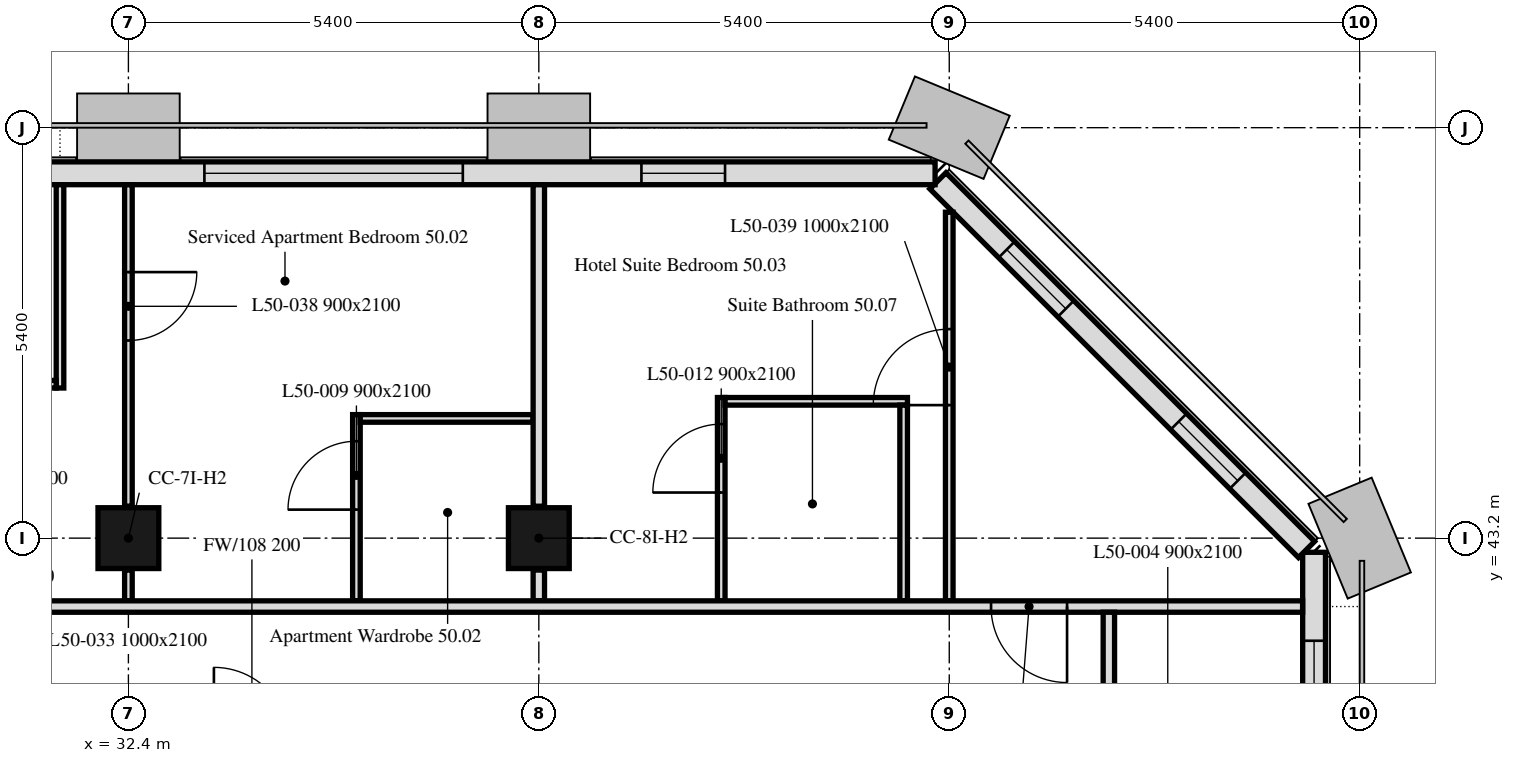
"""IFC4 building model, lengths in metres.
Left out: names, types, materials, properties, quantities, classifications, styles, units other than length and angle.
Written with IfcOpenShell. Run it as: python <this file> out.ifc"""

import sys

from ifc_helpers import new_model, si_unit, direction, frame, frame_2d, origin, origin_2d, place, context, subcontext, project, spatial, rectangle, extrude, element, fill, save


model = new_model("IFC4")
c1 = context("Model", 3, precision=1e-05, world=origin(), true_north=direction((0.0, 1.0)))
c2 = subcontext(c1, "Body", "Model", "MODEL_VIEW")
j1 = project(units=[si_unit("LENGTHUNIT", "METRE"), si_unit("PLANEANGLEUNIT", "RADIAN")], contexts=[c1])
p1 = place(None, origin())
s1 = spatial("IfcSite", under=j1, at=p1, CompositionType="ELEMENT")
p2 = place(p1, origin())
s2 = spatial("IfcBuilding", under=s1, at=p2, CompositionType="ELEMENT")
p3 = place(p2, frame((0.0, 0.0, 203.8)))
s3 = spatial("IfcBuildingStorey", under=s2, at=p3, CompositionType="ELEMENT", Elevation=203.8)
for number, where, z_axis, x_axis in (
    (1, (32.4, 43.2, 0.0), (0.0, 0.0, 1.0), (1.0, 0.0, 0.0)),
    (2, (37.8, 43.2, 0.0), (0.0, 0.0, 1.0), (1.0, 0.0, 0.0)),
):
    element("IfcColumn", number, at=place(p3, frame(where, z_axis=z_axis, x_axis=x_axis)), inside=s3, PredefinedType="COLUMN", context=c2, shape_type="SweptSolid", body=[
        extrude(rectangle(XDim=0.8, YDim=0.8, at=origin_2d()), origin(), (0.0, 0.0, 1.0), 3.0),
    ])
p4 = place(p3, frame((48.0, 10.986, 0.0), z_axis=(0.0, 0.0, 1.0), x_axis=(0.0, 1.0, 0.0)))
e3 = element("IfcWall", 3, at=p4, inside=s3, PredefinedType="SOLIDWALL", context=c2, shape_type="SweptSolid", body=[
    extrude(rectangle(XDim=32.027, YDim=0.3, at=frame_2d((16.014, 0.0))), origin(), (0.0, 0.0, 1.0), 3.0),
])
p5 = place(p4, frame((1.164, 0.0, 0.9)))
e4 = element("IfcOpeningElement", 4, at=p5, cuts=e3, PredefinedType="OPENING", context=c2, shape_type="SweptSolid", body=[
    extrude(rectangle(XDim=1.1, YDim=1.7, at=frame_2d((0.55, 0.85))), frame((0.0, 0.16, 0.0), z_axis=(0.0, -1.0, 0.0), x_axis=(1.0, 0.0, 0.0)), (0.0, 0.0, 1.0), 0.32),
])
p6 = place(p4, frame((2.764, 0.0, 0.9)))
e5 = element("IfcOpeningElement", 5, at=p6, cuts=e3, PredefinedType="OPENING", context=c2, shape_type="SweptSolid", body=[
    extrude(rectangle(XDim=1.1, YDim=1.7, at=frame_2d((0.55, 0.85))), frame((0.0, 0.16, 0.0), z_axis=(0.0, -1.0, 0.0), x_axis=(1.0, 0.0, 0.0)), (0.0, 0.0, 1.0), 0.32),
])
p7 = place(p4, frame((6.214, 0.0, 0.9)))
e6 = element("IfcOpeningElement", 6, at=p7, cuts=e3, PredefinedType="OPENING", context=c2, shape_type="SweptSolid", body=[
    extrude(rectangle(XDim=3.4, YDim=1.7, at=frame_2d((1.7, 0.85))), frame((0.0, 0.16, 0.0), z_axis=(0.0, -1.0, 0.0), x_axis=(1.0, 0.0, 0.0)), (0.0, 0.0, 1.0), 0.32),
])
p8 = place(p4, frame((11.964, 0.0, 0.9)))
e7 = element("IfcOpeningElement", 7, at=p8, cuts=e3, PredefinedType="OPENING", context=c2, shape_type="SweptSolid", body=[
    extrude(rectangle(XDim=1.1, YDim=1.7, at=frame_2d((0.55, 0.85))), frame((0.0, 0.16, 0.0), z_axis=(0.0, -1.0, 0.0), x_axis=(1.0, 0.0, 0.0)), (0.0, 0.0, 1.0), 0.32),
])
p9 = place(p4, frame((13.564, 0.0, 0.9)))
e8 = element("IfcOpeningElement", 8, at=p9, cuts=e3, PredefinedType="OPENING", context=c2, shape_type="SweptSolid", body=[
    extrude(rectangle(XDim=1.1, YDim=1.7, at=frame_2d((0.55, 0.85))), frame((0.0, 0.16, 0.0), z_axis=(0.0, -1.0, 0.0), x_axis=(1.0, 0.0, 0.0)), (0.0, 0.0, 1.0), 0.32),
])
p10 = place(p4, frame((17.014, 0.0, 0.9)))
e9 = element("IfcOpeningElement", 9, at=p10, cuts=e3, PredefinedType="OPENING", context=c2, shape_type="SweptSolid", body=[
    extrude(rectangle(XDim=3.4, YDim=1.7, at=frame_2d((1.7, 0.85))), frame((0.0, 0.16, 0.0), z_axis=(0.0, -1.0, 0.0), x_axis=(1.0, 0.0, 0.0)), (0.0, 0.0, 1.0), 0.32),
])
p11 = place(p4, frame((22.764, 0.0, 0.9)))
e10 = element("IfcOpeningElement", 10, at=p11, cuts=e3, PredefinedType="OPENING", context=c2, shape_type="SweptSolid", body=[
    extrude(rectangle(XDim=1.1, YDim=1.7, at=frame_2d((0.55, 0.85))), frame((0.0, 0.16, 0.0), z_axis=(0.0, -1.0, 0.0), x_axis=(1.0, 0.0, 0.0)), (0.0, 0.0, 1.0), 0.32),
])
p12 = place(p4, frame((24.364, 0.0, 0.9)))
e11 = element("IfcOpeningElement", 11, at=p12, cuts=e3, PredefinedType="OPENING", context=c2, shape_type="SweptSolid", body=[
    extrude(rectangle(XDim=1.1, YDim=1.7, at=frame_2d((0.55, 0.85))), frame((0.0, 0.16, 0.0), z_axis=(0.0, -1.0, 0.0), x_axis=(1.0, 0.0, 0.0)), (0.0, 0.0, 1.0), 0.32),
])
p13 = place(p4, frame((28.789, 0.0, 0.9)))
e12 = element("IfcOpeningElement", 12, at=p13, cuts=e3, PredefinedType="OPENING", context=c2, shape_type="SweptSolid", body=[
    extrude(rectangle(XDim=0.65, YDim=1.7, at=frame_2d((0.325, 0.85))), frame((0.0, 0.16, 0.0), z_axis=(0.0, -1.0, 0.0), x_axis=(1.0, 0.0, 0.0)), (0.0, 0.0, 1.0), 0.32),
])
p14 = place(p4, frame((29.764, 0.0, 0.9)))
e13 = element("IfcOpeningElement", 13, at=p14, cuts=e3, PredefinedType="OPENING", context=c2, shape_type="SweptSolid", body=[
    extrude(rectangle(XDim=1.1, YDim=1.7, at=frame_2d((0.55, 0.85))), frame((0.0, 0.16, 0.0), z_axis=(0.0, -1.0, 0.0), x_axis=(1.0, 0.0, 0.0)), (0.0, 0.0, 1.0), 0.32),
])
p15 = place(p3, frame((47.901, 43.051, 0.0), z_axis=(0.0, 0.0, 1.0), x_axis=(-0.707106781187, 0.707106781187, 0.0)))
e14 = element("IfcWall", 14, at=p15, inside=s3, PredefinedType="SOLIDWALL", context=c2, shape_type="SweptSolid", body=[
    extrude(rectangle(XDim=6.86, YDim=0.3, at=frame_2d((3.43, 0.0))), origin(), (0.0, 0.0, 1.0), 3.0),
])
p16 = place(p15, frame((1.28, 0.0, 0.9)))
e15 = element("IfcOpeningElement", 15, at=p16, cuts=e14, PredefinedType="OPENING", context=c2, shape_type="SweptSolid", body=[
    extrude(rectangle(XDim=1.1, YDim=1.7, at=frame_2d((0.55, 0.85))), frame((0.0, 0.16, 0.0), z_axis=(0.0, -1.0, 0.0), x_axis=(1.0, 0.0, 0.0)), (0.0, 0.0, 1.0), 0.32),
])
p17 = place(p15, frame((4.48, 0.0, 0.9)))
e16 = element("IfcOpeningElement", 16, at=p17, cuts=e14, PredefinedType="OPENING", context=c2, shape_type="SweptSolid", body=[
    extrude(rectangle(XDim=1.1, YDim=1.7, at=frame_2d((0.55, 0.85))), frame((0.0, 0.16, 0.0), z_axis=(0.0, -1.0, 0.0), x_axis=(1.0, 0.0, 0.0)), (0.0, 0.0, 1.0), 0.32),
])
p18 = place(p3, frame((43.014, 48.0, 0.0), z_axis=(0.0, 0.0, 1.0), x_axis=(-1.0, 0.0, 0.0)))
e17 = element("IfcWall", 17, at=p18, inside=s3, PredefinedType="SOLIDWALL", context=c2, shape_type="SweptSolid", body=[
    extrude(rectangle(XDim=32.027, YDim=0.3, at=frame_2d((16.014, 0.0))), origin(), (0.0, 0.0, 1.0), 3.0),
])
p19 = place(p18, frame((2.764, 0.0, 0.9)))
e18 = element("IfcOpeningElement", 18, at=p19, cuts=e17, PredefinedType="OPENING", context=c2, shape_type="SweptSolid", body=[
    extrude(rectangle(XDim=1.1, YDim=1.7, at=frame_2d((0.55, 0.85))), frame((0.0, 0.16, 0.0), z_axis=(0.0, -1.0, 0.0), x_axis=(1.0, 0.0, 0.0)), (0.0, 0.0, 1.0), 0.32),
])
p20 = place(p18, frame((6.214, 0.0, 0.9)))
e19 = element("IfcOpeningElement", 19, at=p20, cuts=e17, PredefinedType="OPENING", context=c2, shape_type="SweptSolid", body=[
    extrude(rectangle(XDim=3.4, YDim=1.7, at=frame_2d((1.7, 0.85))), frame((0.0, 0.16, 0.0), z_axis=(0.0, -1.0, 0.0), x_axis=(1.0, 0.0, 0.0)), (0.0, 0.0, 1.0), 0.32),
])
p21 = place(p18, frame((12.664, 0.0, 0.9)))
e20 = element("IfcOpeningElement", 20, at=p21, cuts=e17, PredefinedType="OPENING", context=c2, shape_type="SweptSolid", body=[
    extrude(rectangle(XDim=1.1, YDim=1.7, at=frame_2d((0.55, 0.85))), frame((0.0, 0.16, 0.0), z_axis=(0.0, -1.0, 0.0), x_axis=(1.0, 0.0, 0.0)), (0.0, 0.0, 1.0), 0.32),
])
p22 = place(p18, frame((17.014, 0.0, 0.9)))
e21 = element("IfcOpeningElement", 21, at=p22, cuts=e17, PredefinedType="OPENING", context=c2, shape_type="SweptSolid", body=[
    extrude(rectangle(XDim=3.4, YDim=1.7, at=frame_2d((1.7, 0.85))), frame((0.0, 0.16, 0.0), z_axis=(0.0, -1.0, 0.0), x_axis=(1.0, 0.0, 0.0)), (0.0, 0.0, 1.0), 0.32),
])
p23 = place(p18, frame((23.464, 0.0, 0.9)))
e22 = element("IfcOpeningElement", 22, at=p23, cuts=e17, PredefinedType="OPENING", context=c2, shape_type="SweptSolid", body=[
    extrude(rectangle(XDim=1.1, YDim=1.7, at=frame_2d((0.55, 0.85))), frame((0.0, 0.16, 0.0), z_axis=(0.0, -1.0, 0.0), x_axis=(1.0, 0.0, 0.0)), (0.0, 0.0, 1.0), 0.32),
])
p24 = place(p18, frame((27.814, 0.0, 0.9)))
e23 = element("IfcOpeningElement", 23, at=p24, cuts=e17, PredefinedType="OPENING", context=c2, shape_type="SweptSolid", body=[
    extrude(rectangle(XDim=3.4, YDim=1.7, at=frame_2d((1.7, 0.85))), frame((0.0, 0.16, 0.0), z_axis=(0.0, -1.0, 0.0), x_axis=(1.0, 0.0, 0.0)), (0.0, 0.0, 1.0), 0.32),
])
p25 = place(p3, frame((32.4, 47.849, 0.0), z_axis=(0.0, 0.0, 1.0), x_axis=(0.0, -1.0, 0.0)))
e24 = element("IfcWall", 24, at=p25, inside=s3, PredefinedType="PARTITIONING", context=c2, shape_type="SweptSolid", body=[
    extrude(rectangle(XDim=4.229, YDim=0.1, at=frame_2d((2.115, 0.0))), origin(), (0.0, 0.0, 1.0), 2.4),
])
p26 = place(p25, frame((1.149, 0.0, 0.0)))
e25 = element("IfcOpeningElement", 25, at=p26, cuts=e24, PredefinedType="OPENING", context=c2, shape_type="SweptSolid", body=[
    extrude(rectangle(XDim=0.9, YDim=2.1, at=frame_2d((0.45, 1.05))), frame((0.0, 0.05, 0.0), z_axis=(0.0, -1.0, 0.0), x_axis=(1.0, 0.0, 0.0)), (0.0, 0.0, 1.0), 0.1),
])
p27 = place(p3, frame((32.4, 42.78, 0.0), z_axis=(0.0, 0.0, 1.0), x_axis=(0.0, -1.0, 0.0)))
e26 = element("IfcWall", 26, at=p27, inside=s3, PredefinedType="PARTITIONING", context=c2, shape_type="SweptSolid", body=[
    extrude(rectangle(XDim=0.405, YDim=0.1, at=frame_2d((0.203, 0.0))), origin(), (0.0, 0.0, 1.0), 2.4),
])
p28 = place(p3, frame((35.4, 42.375, 0.0), z_axis=(0.0, 0.0, 1.0), x_axis=(0.0, 1.0, 0.0)))
e27 = element("IfcWall", 27, at=p28, inside=s3, PredefinedType="PARTITIONING", context=c2, shape_type="SweptSolid", body=[
    extrude(rectangle(XDim=2.45, YDim=0.1, at=frame_2d((1.225, 0.0))), origin(), (0.0, 0.0, 1.0), 3.0),
])
p29 = place(p28, frame((1.2, 0.0, 0.0)))
e28 = element("IfcOpeningElement", 28, at=p29, cuts=e27, PredefinedType="OPENING", context=c2, shape_type="SweptSolid", body=[
    extrude(rectangle(XDim=0.9, YDim=2.1, at=frame_2d((0.45, 1.05))), frame((0.0, 0.05, 0.0), z_axis=(0.0, -1.0, 0.0), x_axis=(1.0, 0.0, 0.0)), (0.0, 0.0, 1.0), 0.1),
])
p30 = place(p3, frame((35.45, 44.775, 0.0), z_axis=(0.0, 0.0, 1.0), x_axis=(1.0, 0.0, 0.0)))
e29 = element("IfcWall", 29, at=p30, inside=s3, PredefinedType="PARTITIONING", context=c2, shape_type="SweptSolid", body=[
    extrude(rectangle(XDim=2.275, YDim=0.1, at=frame_2d((1.138, 0.0))), origin(), (0.0, 0.0, 1.0), 3.0),
])
p31 = place(p3, frame((31.5, 47.849, 0.0), z_axis=(0.0, 0.0, 1.0), x_axis=(0.0, -1.0, 0.0)))
e30 = element("IfcWall", 30, at=p31, inside=s3, PredefinedType="PARTITIONING", context=c2, shape_type="SweptSolid", body=[
    extrude(rectangle(XDim=2.674, YDim=0.1, at=frame_2d((1.337, 0.0))), origin(), (0.0, 0.0, 1.0), 3.0),
])
p32 = place(p3, frame((31.45, 45.225, 0.0), z_axis=(0.0, 0.0, 1.0), x_axis=(-1.0, 0.0, 0.0)))
e31 = element("IfcWall", 31, at=p32, inside=s3, PredefinedType="PARTITIONING", context=c2, shape_type="SweptSolid", body=[
    extrude(rectangle(XDim=2.3, YDim=0.1, at=frame_2d((1.15, 0.0))), origin(), (0.0, 0.0, 1.0), 3.0),
])
p33 = place(p32, frame((1.1, 0.0, 0.0)))
e32 = element("IfcOpeningElement", 32, at=p33, cuts=e31, PredefinedType="OPENING", context=c2, shape_type="SweptSolid", body=[
    extrude(rectangle(XDim=0.9, YDim=2.1, at=frame_2d((0.45, 1.05))), frame((0.0, 0.05, 0.0), z_axis=(0.0, -1.0, 0.0), x_axis=(1.0, 0.0, 0.0)), (0.0, 0.0, 1.0), 0.1),
])
p34 = place(p3, frame((37.8, 42.375, 0.0), z_axis=(0.0, 0.0, 1.0), x_axis=(0.0, 1.0, 0.0)))
e33 = element("IfcWall", 33, at=p34, inside=s3, PredefinedType="PARTITIONING", context=c2, shape_type="SweptSolid", body=[
    extrude(rectangle(XDim=0.405, YDim=0.15, at=frame_2d((0.203, 0.0))), origin(), (0.0, 0.0, 1.0), 2.4),
])
p35 = place(p3, frame((37.8, 43.62, 0.0), z_axis=(0.0, 0.0, 1.0), x_axis=(0.0, 1.0, 0.0)))
e34 = element("IfcWall", 34, at=p35, inside=s3, PredefinedType="PARTITIONING", context=c2, shape_type="SweptSolid", body=[
    extrude(rectangle(XDim=4.229, YDim=0.15, at=frame_2d((2.115, 0.0))), origin(), (0.0, 0.0, 1.0), 2.4),
])
p36 = place(p3, frame((40.2, 42.375, 0.0), z_axis=(0.0, 0.0, 1.0), x_axis=(0.0, 1.0, 0.0)))
e35 = element("IfcWall", 35, at=p36, inside=s3, PredefinedType="PARTITIONING", context=c2, shape_type="SweptSolid", body=[
    extrude(rectangle(XDim=2.675, YDim=0.1, at=frame_2d((1.337, 0.0))), origin(), (0.0, 0.0, 1.0), 3.0),
])
p37 = place(p36, frame((1.425, 0.0, 0.0)))
e36 = element("IfcOpeningElement", 36, at=p37, cuts=e35, PredefinedType="OPENING", context=c2, shape_type="SweptSolid", body=[
    extrude(rectangle(XDim=0.9, YDim=2.1, at=frame_2d((0.45, 1.05))), frame((0.0, 0.05, 0.0), z_axis=(0.0, -1.0, 0.0), x_axis=(1.0, 0.0, 0.0)), (0.0, 0.0, 1.0), 0.1),
])
p38 = place(p3, frame((40.25, 45.0, 0.0), z_axis=(0.0, 0.0, 1.0), x_axis=(1.0, 0.0, 0.0)))
e37 = element("IfcWall", 37, at=p38, inside=s3, PredefinedType="PARTITIONING", context=c2, shape_type="SweptSolid", body=[
    extrude(rectangle(XDim=2.4, YDim=0.1, at=frame_2d((1.2, 0.0))), origin(), (0.0, 0.0, 1.0), 3.0),
])
p39 = place(p3, frame((42.6, 44.95, 0.0), z_axis=(0.0, 0.0, 1.0), x_axis=(0.0, -1.0, 0.0)))
e38 = element("IfcWall", 38, at=p39, inside=s3, PredefinedType="PARTITIONING", context=c2, shape_type="SweptSolid", body=[
    extrude(rectangle(XDim=2.575, YDim=0.1, at=frame_2d((1.288, 0.0))), origin(), (0.0, 0.0, 1.0), 3.0),
])
p40 = place(p3, frame((43.2, 42.375, 0.0), z_axis=(0.0, 0.0, 1.0), x_axis=(0.0, 1.0, 0.0)))
e39 = element("IfcWall", 39, at=p40, inside=s3, PredefinedType="PARTITIONING", context=c2, shape_type="SweptSolid", body=[
    extrude(rectangle(XDim=5.113, YDim=0.1, at=frame_2d((2.556, 0.0))), origin(), (0.0, 0.0, 1.0), 3.0),
])
p41 = place(p40, frame((2.575, 0.0, 0.0)))
e40 = element("IfcOpeningElement", 40, at=p41, cuts=e39, PredefinedType="OPENING", context=c2, shape_type="SweptSolid", body=[
    extrude(rectangle(XDim=1.0, YDim=2.1, at=frame_2d((0.5, 1.05))), frame((0.0, 0.05, 0.0), z_axis=(0.0, -1.0, 0.0), x_axis=(1.0, 0.0, 0.0)), (0.0, 0.0, 1.0), 0.1),
])
p42 = place(p3, frame((47.849, 42.3, 0.0), z_axis=(0.0, 0.0, 1.0), x_axis=(-1.0, 0.0, 0.0)))
e41 = element("IfcWall", 41, at=p42, inside=s3, PredefinedType="PARTITIONING", context=c2, shape_type="SweptSolid", body=[
    extrude(rectangle(XDim=41.698, YDim=0.15, at=frame_2d((20.849, 0.0))), origin(), (0.0, 0.0, 1.0), 2.4),
])
p43 = place(p42, frame((39.566, 0.0, 0.0)))
e42 = element("IfcOpeningElement", 42, at=p43, cuts=e41, PredefinedType="OPENING", context=c2, shape_type="SweptSolid", body=[
    extrude(rectangle(XDim=1.0, YDim=2.1, at=frame_2d((0.5, 1.05))), frame((0.0, 0.075, 0.0), z_axis=(0.0, -1.0, 0.0), x_axis=(1.0, 0.0, 0.0)), (0.0, 0.0, 1.0), 0.15),
])
p44 = place(p42, frame((3.099, 0.0, 0.0)))
e43 = element("IfcOpeningElement", 43, at=p44, cuts=e41, PredefinedType="OPENING", context=c2, shape_type="SweptSolid", body=[
    extrude(rectangle(XDim=1.0, YDim=2.1, at=frame_2d((0.5, 1.05))), frame((0.0, 0.075, 0.0), z_axis=(0.0, -1.0, 0.0), x_axis=(1.0, 0.0, 0.0)), (0.0, 0.0, 1.0), 0.15),
])
p45 = place(p42, frame((28.249, 0.0, 0.0)))
e44 = element("IfcOpeningElement", 44, at=p45, cuts=e41, PredefinedType="OPENING", context=c2, shape_type="SweptSolid", body=[
    extrude(rectangle(XDim=1.0, YDim=2.1, at=frame_2d((0.5, 1.05))), frame((0.0, 0.075, 0.0), z_axis=(0.0, -1.0, 0.0), x_axis=(1.0, 0.0, 0.0)), (0.0, 0.0, 1.0), 0.15),
])
p46 = place(p42, frame((17.449, 0.0, 0.0)))
e45 = element("IfcOpeningElement", 45, at=p46, cuts=e41, PredefinedType="OPENING", context=c2, shape_type="SweptSolid", body=[
    extrude(rectangle(XDim=1.0, YDim=2.1, at=frame_2d((0.5, 1.05))), frame((0.0, 0.075, 0.0), z_axis=(0.0, -1.0, 0.0), x_axis=(1.0, 0.0, 0.0)), (0.0, 0.0, 1.0), 0.15),
])
p47 = place(p3, frame((45.3, 42.225, 0.0), z_axis=(0.0, 0.0, 1.0), x_axis=(0.0, -1.0, 0.0)))
e46 = element("IfcWall", 46, at=p47, inside=s3, PredefinedType="PARTITIONING", context=c2, shape_type="SweptSolid", body=[
    extrude(rectangle(XDim=30.45, YDim=0.15, at=frame_2d((15.225, 0.0))), origin(), (0.0, 0.0, 1.0), 2.4),
])
p48 = place(p47, frame((12.025, 0.0, 0.0)))
e47 = element("IfcOpeningElement", 47, at=p48, cuts=e46, PredefinedType="OPENING", context=c2, shape_type="SweptSolid", body=[
    extrude(rectangle(XDim=1.0, YDim=2.1, at=frame_2d((0.5, 1.05))), frame((0.0, 0.075, 0.0), z_axis=(0.0, -1.0, 0.0), x_axis=(1.0, 0.0, 0.0)), (0.0, 0.0, 1.0), 0.15),
])
p49 = place(p47, frame((27.775, 0.0, 0.0)))
e48 = element("IfcOpeningElement", 48, at=p49, cuts=e46, PredefinedType="OPENING", context=c2, shape_type="SweptSolid", body=[
    extrude(rectangle(XDim=1.0, YDim=2.1, at=frame_2d((0.5, 1.05))), frame((0.0, 0.075, 0.0), z_axis=(0.0, -1.0, 0.0), x_axis=(1.0, 0.0, 0.0)), (0.0, 0.0, 1.0), 0.15),
])
p50 = place(p47, frame((6.192, 0.0, 0.0)))
e49 = element("IfcOpeningElement", 49, at=p50, cuts=e46, PredefinedType="OPENING", context=c2, shape_type="SweptSolid", body=[
    extrude(rectangle(XDim=1.0, YDim=2.1, at=frame_2d((0.5, 1.05))), frame((0.0, 0.075, 0.0), z_axis=(0.0, -1.0, 0.0), x_axis=(1.0, 0.0, 0.0)), (0.0, 0.0, 1.0), 0.15),
])
p51 = place(p47, frame((21.475, 0.0, 0.0)))
e50 = element("IfcOpeningElement", 50, at=p51, cuts=e46, PredefinedType="OPENING", context=c2, shape_type="SweptSolid", body=[
    extrude(rectangle(XDim=1.0, YDim=2.1, at=frame_2d((0.5, 1.05))), frame((0.0, 0.075, 0.0), z_axis=(0.0, -1.0, 0.0), x_axis=(1.0, 0.0, 0.0)), (0.0, 0.0, 1.0), 0.15),
])
p52 = place(p14, origin())
e51 = element("IfcWindow", 51, at=p52, inside=s3, PartitioningType="SINGLE_PANEL", PredefinedType="WINDOW", context=c2, shape_type="SweptSolid", body=[
    extrude(rectangle(XDim=1.1, YDim=1.7, at=frame_2d((0.55, 0.85))), frame((0.0, 0.03, 0.0), z_axis=(0.0, -1.0, 0.0), x_axis=(1.0, 0.0, 0.0)), (0.0, 0.0, 1.0), 0.06),
])
fill(e13, e51)
p53 = place(p16, origin())
e52 = element("IfcWindow", 52, at=p53, inside=s3, PartitioningType="SINGLE_PANEL", PredefinedType="WINDOW", context=c2, shape_type="SweptSolid", body=[
    extrude(rectangle(XDim=1.1, YDim=1.7, at=frame_2d((0.55, 0.85))), frame((0.0, 0.03, 0.0), z_axis=(0.0, -1.0, 0.0), x_axis=(1.0, 0.0, 0.0)), (0.0, 0.0, 1.0), 0.06),
])
fill(e15, e52)
p54 = place(p17, origin())
e53 = element("IfcWindow", 53, at=p54, inside=s3, PartitioningType="SINGLE_PANEL", PredefinedType="WINDOW", context=c2, shape_type="SweptSolid", body=[
    extrude(rectangle(XDim=1.1, YDim=1.7, at=frame_2d((0.55, 0.85))), frame((0.0, 0.03, 0.0), z_axis=(0.0, -1.0, 0.0), x_axis=(1.0, 0.0, 0.0)), (0.0, 0.0, 1.0), 0.06),
])
fill(e16, e53)
p55 = place(p19, origin())
e54 = element("IfcWindow", 54, at=p55, inside=s3, PartitioningType="SINGLE_PANEL", PredefinedType="WINDOW", context=c2, shape_type="SweptSolid", body=[
    extrude(rectangle(XDim=1.1, YDim=1.7, at=frame_2d((0.55, 0.85))), frame((0.0, 0.03, 0.0), z_axis=(0.0, -1.0, 0.0), x_axis=(1.0, 0.0, 0.0)), (0.0, 0.0, 1.0), 0.06),
])
fill(e18, e54)
p56 = place(p20, origin())
e55 = element("IfcWindow", 55, at=p56, inside=s3, PartitioningType="SINGLE_PANEL", PredefinedType="WINDOW", context=c2, shape_type="SweptSolid", body=[
    extrude(rectangle(XDim=3.4, YDim=1.7, at=frame_2d((1.7, 0.85))), frame((0.0, 0.03, 0.0), z_axis=(0.0, -1.0, 0.0), x_axis=(1.0, 0.0, 0.0)), (0.0, 0.0, 1.0), 0.06),
])
fill(e19, e55)
p57 = place(p29, origin())
e56 = element("IfcDoor", 56, at=p57, inside=s3, OperationType="SINGLE_SWING_LEFT", PredefinedType="DOOR", context=c2, shape_type="SweptSolid", body=[
    extrude(rectangle(XDim=0.9, YDim=2.1, at=frame_2d((0.45, 1.05))), frame((0.0, 0.025, 0.0), z_axis=(0.0, -1.0, 0.0), x_axis=(1.0, 0.0, 0.0)), (0.0, 0.0, 1.0), 0.05),
])
fill(e28, e56)
p58 = place(p37, origin())
e57 = element("IfcDoor", 57, at=p58, inside=s3, OperationType="SINGLE_SWING_RIGHT", PredefinedType="DOOR", context=c2, shape_type="SweptSolid", body=[
    extrude(rectangle(XDim=0.9, YDim=2.1, at=frame_2d((0.45, 1.05))), frame((0.0, 0.025, 0.0), z_axis=(0.0, -1.0, 0.0), x_axis=(1.0, 0.0, 0.0)), (0.0, 0.0, 1.0), 0.05),
])
fill(e36, e57)
p59 = place(p26, origin())
e58 = element("IfcDoor", 58, at=p59, inside=s3, OperationType="SINGLE_SWING_RIGHT", PredefinedType="DOOR", context=c2, shape_type="SweptSolid", body=[
    extrude(rectangle(XDim=0.9, YDim=2.1, at=frame_2d((0.45, 1.05))), frame((0.0, 0.025, 0.0), z_axis=(0.0, -1.0, 0.0), x_axis=(1.0, 0.0, 0.0)), (0.0, 0.0, 1.0), 0.05),
])
fill(e25, e58)
p60 = place(p41, origin())
e59 = element("IfcDoor", 59, at=p60, inside=s3, OperationType="SINGLE_SWING_RIGHT", PredefinedType="DOOR", context=c2, shape_type="SweptSolid", body=[
    extrude(rectangle(XDim=1.0, YDim=2.1, at=frame_2d((0.5, 1.05))), frame((0.0, 0.025, 0.0), z_axis=(0.0, -1.0, 0.0), x_axis=(1.0, 0.0, 0.0)), (0.0, 0.0, 1.0), 0.05),
])
fill(e40, e59)
p61 = place(p44, origin())
e60 = element("IfcDoor", 60, at=p61, inside=s3, OperationType="SINGLE_SWING_RIGHT", PredefinedType="DOOR", context=c2, shape_type="SweptSolid", body=[
    extrude(rectangle(XDim=1.0, YDim=2.1, at=frame_2d((0.5, 1.05))), frame((0.0, 0.025, 0.0), z_axis=(0.0, -1.0, 0.0), x_axis=(1.0, 0.0, 0.0)), (0.0, 0.0, 1.0), 0.05),
])
fill(e43, e60)
save(model, sys.argv[1])
